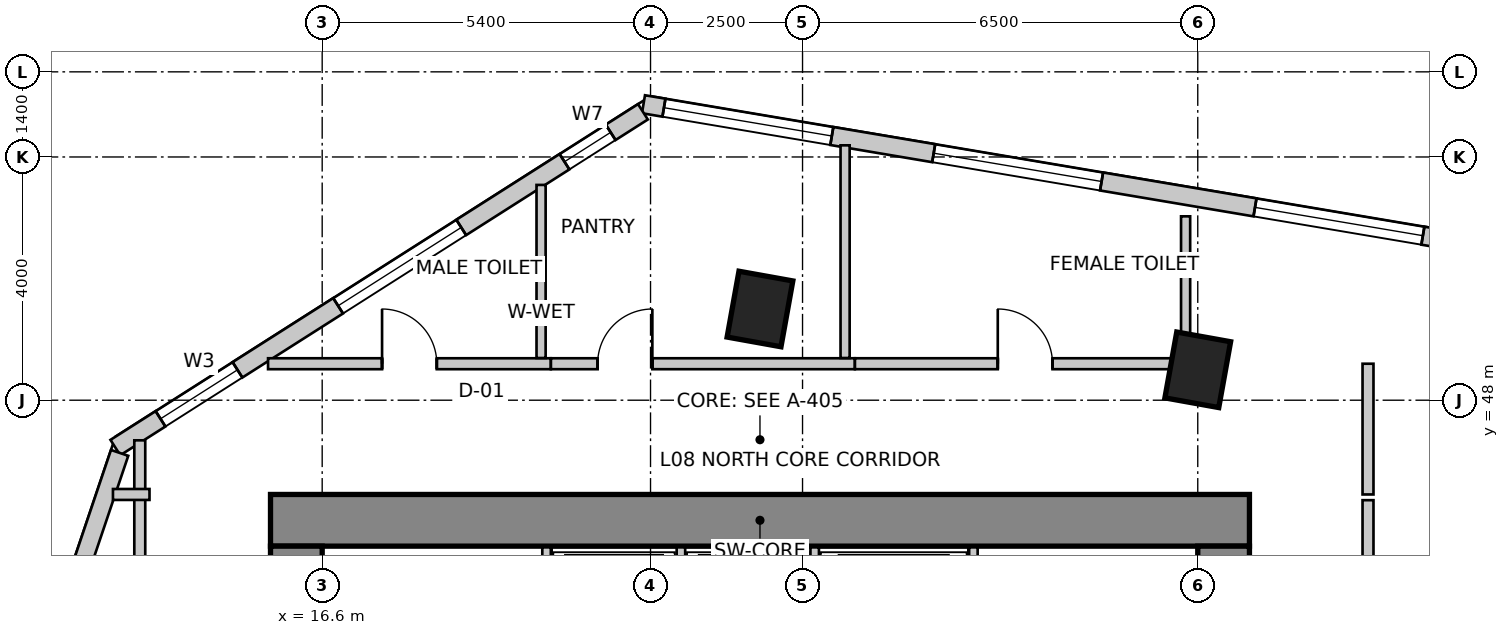
"""IFC4 building model, lengths in metres.
Left out: names, types, materials, properties, quantities, classifications, styles, units other than length and angle.
Written with IfcOpenShell. Run it as: python <this file> out.ifc"""

import sys

from ifc_helpers import new_model, si_unit, direction, frame, frame_2d, origin, origin_2d, place, context, subcontext, project, spatial, rectangle, extrude, source, transform, mapped, element, fill, save


model = new_model("IFC4")
c1 = context("Model", 3, precision=1e-05, world=origin(), true_north=direction((0.0, 1.0)))
c2 = subcontext(c1, "Body", "Model", "MODEL_VIEW")
j1 = project(units=[si_unit("LENGTHUNIT", "METRE"), si_unit("PLANEANGLEUNIT", "RADIAN")], contexts=[c1])
p1 = place(None, origin())
s1 = spatial("IfcSite", under=j1, at=p1, CompositionType="ELEMENT")
p2 = place(p1, origin())
s2 = spatial("IfcBuilding", under=s1, at=p2, CompositionType="ELEMENT")
p3 = place(p2, frame((0.0, 0.0, 35.0)))
s3 = spatial("IfcBuildingStorey", under=s2, at=p3, CompositionType="ELEMENT", Elevation=35.0)
p4 = place(p3, frame((15.75, 46.025, 0.0), z_axis=(0.0, 0.0, 1.0), x_axis=(1.0, 0.0, 0.0)))
e1 = element("IfcWall", 1, at=p4, inside=s3, PredefinedType="SHEAR", context=c2, shape_type="SweptSolid", body=[
    extrude(rectangle(XDim=16.1, YDim=0.85, at=frame_2d((8.05, 0.0))), origin(), (0.0, 0.0, 1.0), 4.0),
])
p5 = place(p3, frame((16.175, 34.2, 0.0), z_axis=(0.0, 0.0, 1.0), x_axis=(0.0, 1.0, 0.0)))
e2 = element("IfcWall", 2, at=p5, inside=s3, PredefinedType="SHEAR", context=c2, shape_type="SweptSolid", body=[
    extrude(rectangle(XDim=11.4, YDim=0.85, at=frame_2d((5.7, 0.0))), origin(), (0.0, 0.0, 1.0), 4.0),
])
m1 = source(origin(), c2, "Body", "SweptSolid", [
    extrude(rectangle(XDim=1.1, YDim=2.15, at=frame_2d((0.55, 1.075))), frame((0.0, 0.435, 0.0), z_axis=(0.0, -1.0, 0.0), x_axis=(1.0, 0.0, 0.0)), (0.0, 0.0, 1.0), 0.87),
])
p6 = place(p5, frame((7.15, 0.0, 0.0)))
e3 = element("IfcOpeningElement", 3, at=p6, cuts=e2, PredefinedType="OPENING", context=c2, shape_type="MappedRepresentation", body=[
    mapped(m1, transform((0.0, 0.0, 0.0), scale=1.0)),
])
p7 = place(p3, frame((31.425, 34.2, 0.0), z_axis=(0.0, 0.0, 1.0), x_axis=(0.0, 1.0, 0.0)))
e4 = element("IfcWall", 4, at=p7, inside=s3, PredefinedType="SHEAR", context=c2, shape_type="SweptSolid", body=[
    extrude(rectangle(XDim=11.4, YDim=0.85, at=frame_2d((5.7, 0.0))), origin(), (0.0, 0.0, 1.0), 4.0),
])
p8 = place(p7, frame((7.35, 0.0, 0.0)))
e5 = element("IfcOpeningElement", 5, at=p8, cuts=e4, PredefinedType="OPENING", context=c2, shape_type="MappedRepresentation", body=[
    mapped(m1, transform((0.0, 0.0, 0.0), scale=1.0)),
])
m2 = source(origin(), c2, "Body", "SweptSolid", [
    extrude(rectangle(XDim=0.9, YDim=1.1, at=origin_2d()), origin(), (0.0, 0.0, 1.0), 4.0),
])
for number, where, z_axis, x_axis in (
    (6, (23.8, 49.5, 0.0), (0.0, 0.0, 1.0), (0.984, -0.177, 0.0)),
    (7, (31.0, 48.5, 0.0), (0.0, 0.0, 1.0), (0.984, -0.177, 0.0)),
):
    element("IfcColumn", number, at=place(p3, frame(where, z_axis=z_axis, x_axis=x_axis)), inside=s3, PredefinedType="COLUMN", context=c2, shape_type="MappedRepresentation", body=[
        mapped(m2, transform((0.0, 0.0, 0.0), scale=1.0)),
    ])
p9 = place(p3, frame((58.761, 46.648, 0.0), z_axis=(0.0, 0.0, 1.0), x_axis=(-0.98607502735, 0.166301053624, 0.0)))
e8 = element("IfcWall", 8, at=p9, inside=s3, PredefinedType="SOLIDWALL", context=c2, shape_type="SweptSolid", body=[
    extrude(rectangle(XDim=37.397, YDim=0.3, at=frame_2d((18.699, 0.0))), origin(), (0.0, 0.0, 1.0), 3.75),
])
m3 = source(origin(), c2, "Body", "SweptSolid", [
    extrude(rectangle(XDim=2.4, YDim=2.2, at=frame_2d((1.2, 1.1))), frame((0.0, 0.16, 0.0), z_axis=(0.0, -1.0, 0.0), x_axis=(1.0, 0.0, 0.0)), (0.0, 0.0, 1.0), 0.32),
])
p10 = place(p9, frame((0.375, 0.0, 0.85)))
e9 = element("IfcOpeningElement", 9, at=p10, cuts=e8, PredefinedType="OPENING", context=c2, shape_type="MappedRepresentation", body=[
    mapped(m3, transform((0.0, 0.0, 0.0), scale=1.0)),
])
m4 = source(origin(), c2, "Body", "SweptSolid", [
    extrude(rectangle(XDim=2.8, YDim=2.4, at=frame_2d((1.4, 1.2))), frame((0.0, 0.16, 0.0), z_axis=(0.0, -1.0, 0.0), x_axis=(1.0, 0.0, 0.0)), (0.0, 0.0, 1.0), 0.32),
])
p11 = place(p9, frame((4.54, 0.0, 0.85)))
e10 = element("IfcOpeningElement", 10, at=p11, cuts=e8, PredefinedType="OPENING", context=c2, shape_type="MappedRepresentation", body=[
    mapped(m4, transform((0.0, 0.0, 0.0), scale=1.0)),
])
p12 = place(p9, frame((10.081, 0.0, 0.85)))
e11 = element("IfcOpeningElement", 11, at=p12, cuts=e8, PredefinedType="OPENING", context=c2, shape_type="MappedRepresentation", body=[
    mapped(m3, transform((0.0, 0.0, 0.0), scale=1.0)),
])
p13 = place(p9, frame((15.273, 0.0, 0.85)))
e12 = element("IfcOpeningElement", 12, at=p13, cuts=e8, PredefinedType="OPENING", context=c2, shape_type="MappedRepresentation", body=[
    mapped(m4, transform((0.0, 0.0, 0.0), scale=1.0)),
])
p14 = place(p9, frame((20.036, 0.0, 0.85)))
e13 = element("IfcOpeningElement", 13, at=p14, cuts=e8, PredefinedType="OPENING", context=c2, shape_type="MappedRepresentation", body=[
    mapped(m3, transform((0.0, 0.0, 0.0), scale=1.0)),
])
p15 = place(p9, frame((24.398, 0.0, 0.85)))
e14 = element("IfcOpeningElement", 14, at=p15, cuts=e8, PredefinedType="OPENING", context=c2, shape_type="MappedRepresentation", body=[
    mapped(m4, transform((0.0, 0.0, 0.0), scale=1.0)),
])
p16 = place(p9, frame((29.757, 0.0, 0.85)))
e15 = element("IfcOpeningElement", 15, at=p16, cuts=e8, PredefinedType="OPENING", context=c2, shape_type="MappedRepresentation", body=[
    mapped(m4, transform((0.0, 0.0, 0.0), scale=1.0)),
])
p17 = place(p9, frame((34.256, 0.0, 0.85)))
e16 = element("IfcOpeningElement", 16, at=p17, cuts=e8, PredefinedType="OPENING", context=c2, shape_type="MappedRepresentation", body=[
    mapped(m4, transform((0.0, 0.0, 0.0), scale=1.0)),
])
p18 = place(p3, frame((21.875, 52.743, 0.0), z_axis=(0.0, 0.0, 1.0), x_axis=(-0.843647802826, -0.536896996441, 0.0)))
e17 = element("IfcWall", 17, at=p18, inside=s3, PredefinedType="SOLIDWALL", context=c2, shape_type="SweptSolid", body=[
    extrude(rectangle(XDim=10.284, YDim=0.3, at=frame_2d((5.142, 0.0))), origin(), (0.0, 0.0, 1.0), 3.75),
])
m5 = source(origin(), c2, "Body", "SweptSolid", [
    extrude(rectangle(XDim=0.9, YDim=1.6, at=frame_2d((0.45, 0.8))), frame((0.0, 0.16, 0.0), z_axis=(0.0, -1.0, 0.0), x_axis=(1.0, 0.0, 0.0)), (0.0, 0.0, 1.0), 0.32),
])
p19 = place(p18, frame((0.629, 0.0, 0.85)))
e18 = element("IfcOpeningElement", 18, at=p19, cuts=e17, PredefinedType="OPENING", context=c2, shape_type="MappedRepresentation", body=[
    mapped(m5, transform((0.0, 0.0, 0.0), scale=1.0)),
])
p20 = place(p18, frame((3.542, 0.0, 0.85)))
e19 = element("IfcOpeningElement", 19, at=p20, cuts=e17, PredefinedType="OPENING", context=c2, shape_type="MappedRepresentation", body=[
    mapped(m3, transform((0.0, 0.0, 0.0), scale=1.0)),
])
m6 = source(origin(), c2, "Body", "SweptSolid", [
    extrude(rectangle(XDim=1.5, YDim=1.8, at=frame_2d((0.75, 0.9))), frame((0.0, 0.16, 0.0), z_axis=(0.0, -1.0, 0.0), x_axis=(1.0, 0.0, 0.0)), (0.0, 0.0, 1.0), 0.32),
])
p21 = place(p18, frame((7.904, 0.0, 0.85)))
e20 = element("IfcOpeningElement", 20, at=p21, cuts=e17, PredefinedType="OPENING", context=c2, shape_type="MappedRepresentation", body=[
    mapped(m6, transform((0.0, 0.0, 0.0), scale=1.0)),
])
p22 = place(p3, frame((13.269, 47.134, 0.0), z_axis=(0.0, 0.0, 1.0), x_axis=(-0.319920423265, -0.947444416722, 0.0)))
e21 = element("IfcWall", 21, at=p22, inside=s3, PredefinedType="SOLIDWALL", context=c2, shape_type="SweptSolid", body=[
    extrude(rectangle(XDim=16.135, YDim=0.3, at=frame_2d((8.067, 0.0))), origin(), (0.0, 0.0, 1.0), 3.75),
])
p23 = place(p22, frame((1.988, 0.0, 0.85)))
e22 = element("IfcOpeningElement", 22, at=p23, cuts=e21, PredefinedType="OPENING", context=c2, shape_type="MappedRepresentation", body=[
    mapped(m4, transform((0.0, 0.0, 0.0), scale=1.0)),
])
p24 = place(p22, frame((7.159, 0.0, 0.85)))
e23 = element("IfcOpeningElement", 23, at=p24, cuts=e21, PredefinedType="OPENING", context=c2, shape_type="MappedRepresentation", body=[
    mapped(m3, transform((0.0, 0.0, 0.0), scale=1.0)),
])
p25 = place(p22, frame((11.93, 0.0, 0.85)))
e24 = element("IfcOpeningElement", 24, at=p25, cuts=e21, PredefinedType="OPENING", context=c2, shape_type="MappedRepresentation", body=[
    mapped(m4, transform((0.0, 0.0, 0.0), scale=1.0)),
])
for number, where, z_axis, x_axis in (
    (25, (20.29, 43.28, 0.0), (0.0, 0.0, 1.0), (0.0, 1.0, 0.0)),
    (26, (27.31, 43.28, 0.0), (0.0, 0.0, 1.0), (0.0, 1.0, 0.0)),
):
    element("IfcWall", number, at=place(p3, frame(where, z_axis=z_axis, x_axis=x_axis)), inside=s3, PredefinedType="SOLIDWALL", context=c2, shape_type="SweptSolid", body=[
        extrude(rectangle(XDim=2.3, YDim=0.14, at=frame_2d((1.15, 0.0))), origin(), (0.0, 0.0, 1.0), 3.75),
    ])
for number, where, z_axis, x_axis in (
    (27, (22.5, 43.02, 0.0), (0.0, 0.0, 1.0), (0.0, 1.0, 0.0)),
    (28, (24.7, 43.02, 0.0), (0.0, 0.0, 1.0), (0.0, 1.0, 0.0)),
):
    element("IfcWall", number, at=place(p3, frame(where, z_axis=z_axis, x_axis=x_axis)), inside=s3, PredefinedType="SOLIDWALL", context=c2, shape_type="SweptSolid", body=[
        extrude(rectangle(XDim=2.56, YDim=0.14, at=frame_2d((1.28, 0.0))), origin(), (0.0, 0.0, 1.0), 3.75),
    ])
p26 = place(p3, frame((13.6, 33.444, 0.0), z_axis=(0.0, 0.0, 1.0), x_axis=(0.0, 1.0, 0.0)))
e29 = element("IfcWall", 29, at=p26, inside=s3, PredefinedType="PARTITIONING", context=c2, shape_type="SweptSolid", body=[
    extrude(rectangle(XDim=13.896, YDim=0.18, at=frame_2d((6.948, 0.0))), origin(), (0.0, 0.0, 1.0), 2.892),
])
m7 = source(origin(), c2, "Body", "SweptSolid", [
    extrude(rectangle(XDim=0.9, YDim=2.15, at=frame_2d((0.45, 1.075))), frame((0.0, 0.1, 0.0), z_axis=(0.0, -1.0, 0.0), x_axis=(1.0, 0.0, 0.0)), (0.0, 0.0, 1.0), 0.2),
])
p27 = place(p26, frame((4.144, 0.0, 0.0)))
e30 = element("IfcOpeningElement", 30, at=p27, cuts=e29, PredefinedType="OPENING", context=c2, shape_type="MappedRepresentation", body=[
    mapped(m7, transform((0.0, 0.0, 0.0), scale=1.0)),
])
p28 = place(p3, frame((13.76, 46.45, 0.0), z_axis=(0.0, 0.0, 1.0), x_axis=(-1.0, 0.0, 0.0)))
e31 = element("IfcWall", 31, at=p28, inside=s3, PredefinedType="PARTITIONING", context=c2, shape_type="SweptSolid", body=[
    extrude(rectangle(XDim=0.601, YDim=0.18, at=frame_2d((0.301, 0.0))), origin(), (0.0, 0.0, 1.0), 3.75),
])
p29 = place(p3, frame((15.71, 48.6, 0.0), z_axis=(0.0, 0.0, 1.0), x_axis=(1.0, 0.0, 0.0)))
e32 = element("IfcWall", 32, at=p29, inside=s3, PredefinedType="PARTITIONING", context=c2, shape_type="SweptSolid", body=[
    extrude(rectangle(XDim=4.65, YDim=0.18, at=frame_2d((2.325, 0.0))), origin(), (0.0, 0.0, 1.0), 3.75),
])
p30 = place(p29, frame((1.875, 0.0, 0.0)))
e33 = element("IfcOpeningElement", 33, at=p30, cuts=e32, PredefinedType="OPENING", context=c2, shape_type="MappedRepresentation", body=[
    mapped(m7, transform((0.0, 0.0, 0.0), scale=1.0)),
])
p31 = place(p3, frame((20.362, 48.6, 0.0), z_axis=(0.0, 0.0, 1.0), x_axis=(1.0, 0.0, 0.0)))
e34 = element("IfcWall", 34, at=p31, inside=s3, PredefinedType="PARTITIONING", context=c2, shape_type="SweptSolid", body=[
    extrude(rectangle(XDim=4.998, YDim=0.18, at=frame_2d((2.499, 0.0))), origin(), (0.0, 0.0, 1.0), 3.434),
])
p32 = place(p31, frame((0.768, 0.0, 0.0)))
e35 = element("IfcOpeningElement", 35, at=p32, cuts=e34, PredefinedType="OPENING", context=c2, shape_type="MappedRepresentation", body=[
    mapped(m7, transform((0.0, 0.0, 0.0), scale=1.0)),
])
p33 = place(p3, frame((25.362, 48.6, 0.0), z_axis=(0.0, 0.0, 1.0), x_axis=(1.0, 0.0, 0.0)))
e36 = element("IfcWall", 36, at=p33, inside=s3, PredefinedType="PARTITIONING", context=c2, shape_type="SweptSolid", body=[
    extrude(rectangle(XDim=5.598, YDim=0.18, at=frame_2d((2.799, 0.0))), origin(), (0.0, 0.0, 1.0), 2.892),
])
p34 = place(p33, frame((2.349, 0.0, 0.0)))
e37 = element("IfcOpeningElement", 37, at=p34, cuts=e36, PredefinedType="OPENING", context=c2, shape_type="MappedRepresentation", body=[
    mapped(m7, transform((0.0, 0.0, 0.0), scale=1.0)),
])
p35 = place(p3, frame((33.8, 48.6, 0.0), z_axis=(0.0, 0.0, 1.0), x_axis=(0.0, -1.0, 0.0)))
e38 = element("IfcWall", 38, at=p35, inside=s3, PredefinedType="PARTITIONING", context=c2, shape_type="SweptSolid", body=[
    extrude(rectangle(XDim=2.15, YDim=0.18, at=frame_2d((1.075, 0.0))), origin(), (0.0, 0.0, 1.0), 2.892),
])
p36 = place(p3, frame((33.8, 46.356, 0.0), z_axis=(0.0, 0.0, 1.0), x_axis=(0.0, -1.0, 0.0)))
e39 = element("IfcWall", 39, at=p36, inside=s3, PredefinedType="PARTITIONING", context=c2, shape_type="SweptSolid", body=[
    extrude(rectangle(XDim=8.516, YDim=0.18, at=frame_2d((4.258, 0.0))), origin(), (0.0, 0.0, 1.0), 3.322),
])
p37 = place(p3, frame((20.2, 51.54, 0.0), z_axis=(0.0, 0.0, 1.0), x_axis=(0.0, -1.0, 0.0)))
e40 = element("IfcWall", 40, at=p37, inside=s3, PredefinedType="PARTITIONING", context=c2, shape_type="SweptSolid", body=[
    extrude(rectangle(XDim=2.846, YDim=0.15, at=frame_2d((1.423, 0.0))), origin(), (0.0, 0.0, 1.0), 3.75),
])
p38 = place(p3, frame((25.2, 52.192, 0.0), z_axis=(0.0, 0.0, 1.0), x_axis=(0.0, -1.0, 0.0)))
e41 = element("IfcWall", 41, at=p38, inside=s3, PredefinedType="PARTITIONING", context=c2, shape_type="SweptSolid", body=[
    extrude(rectangle(XDim=3.498, YDim=0.15, at=frame_2d((1.749, 0.0))), origin(), (0.0, 0.0, 1.0), 2.892),
])
p39 = place(p3, frame((30.8, 51.024, 0.0), z_axis=(0.0, 0.0, 1.0), x_axis=(0.0, -1.0, 0.0)))
e42 = element("IfcWall", 42, at=p39, inside=s3, PredefinedType="PARTITIONING", context=c2, shape_type="SweptSolid", body=[
    extrude(rectangle(XDim=2.204, YDim=0.15, at=frame_2d((1.102, 0.0))), origin(), (0.0, 0.0, 1.0), 3.75),
])
m8 = source(origin(), c2, "Body", "SweptSolid", [
    extrude(rectangle(XDim=2.8, YDim=2.4, at=frame_2d((1.4, 1.2))), frame((0.0, -0.015, 0.0), z_axis=(0.0, -1.0, 0.0), x_axis=(1.0, 0.0, 0.0)), (0.0, 0.0, 1.0), 0.06),
])
p40 = place(p15, origin())
e43 = element("IfcWindow", 43, at=p40, inside=s3, PartitioningType="SINGLE_PANEL", PredefinedType="WINDOW", context=c2, shape_type="MappedRepresentation", body=[
    mapped(m8, transform((0.0, 0.0, 0.0), scale=1.0)),
])
fill(e14, e43)
p41 = place(p16, origin())
e44 = element("IfcWindow", 44, at=p41, inside=s3, PartitioningType="SINGLE_PANEL", PredefinedType="WINDOW", context=c2, shape_type="MappedRepresentation", body=[
    mapped(m8, transform((0.0, 0.0, 0.0), scale=1.0)),
])
fill(e15, e44)
p42 = place(p17, origin())
e45 = element("IfcWindow", 45, at=p42, inside=s3, PartitioningType="SINGLE_PANEL", PredefinedType="WINDOW", context=c2, shape_type="MappedRepresentation", body=[
    mapped(m8, transform((0.0, 0.0, 0.0), scale=1.0)),
])
fill(e16, e45)
m9 = source(origin(), c2, "Body", "SweptSolid", [
    extrude(rectangle(XDim=0.9, YDim=1.6, at=frame_2d((0.45, 0.8))), frame((0.0, -0.015, 0.0), z_axis=(0.0, -1.0, 0.0), x_axis=(1.0, 0.0, 0.0)), (0.0, 0.0, 1.0), 0.06),
])
p43 = place(p19, origin())
e46 = element("IfcWindow", 46, at=p43, inside=s3, PartitioningType="SINGLE_PANEL", PredefinedType="WINDOW", context=c2, shape_type="MappedRepresentation", body=[
    mapped(m9, transform((0.0, 0.0, 0.0), scale=1.0)),
])
fill(e18, e46)
m10 = source(origin(), c2, "Body", "SweptSolid", [
    extrude(rectangle(XDim=2.4, YDim=2.2, at=frame_2d((1.2, 1.1))), frame((0.0, -0.015, 0.0), z_axis=(0.0, -1.0, 0.0), x_axis=(1.0, 0.0, 0.0)), (0.0, 0.0, 1.0), 0.06),
])
p44 = place(p20, origin())
e47 = element("IfcWindow", 47, at=p44, inside=s3, PartitioningType="SINGLE_PANEL", PredefinedType="WINDOW", context=c2, shape_type="MappedRepresentation", body=[
    mapped(m10, transform((0.0, 0.0, 0.0), scale=1.0)),
])
fill(e19, e47)
m11 = source(origin(), c2, "Body", "SweptSolid", [
    extrude(rectangle(XDim=1.5, YDim=1.8, at=frame_2d((0.75, 0.9))), frame((0.0, -0.015, 0.0), z_axis=(0.0, -1.0, 0.0), x_axis=(1.0, 0.0, 0.0)), (0.0, 0.0, 1.0), 0.06),
])
p45 = place(p21, origin())
e48 = element("IfcWindow", 48, at=p45, inside=s3, PartitioningType="SINGLE_PANEL", PredefinedType="WINDOW", context=c2, shape_type="MappedRepresentation", body=[
    mapped(m11, transform((0.0, 0.0, 0.0), scale=1.0)),
])
fill(e20, e48)
m12 = source(origin(), c2, "Body", "SweptSolid", [
    extrude(rectangle(XDim=0.9, YDim=2.15, at=frame_2d((0.45, 1.075))), frame((0.0, 0.025, 0.0), z_axis=(0.0, -1.0, 0.0), x_axis=(1.0, 0.0, 0.0)), (0.0, 0.0, 1.0), 0.05),
])
p46 = place(p30, origin())
e49 = element("IfcDoor", 49, at=p46, inside=s3, OperationType="SINGLE_SWING_LEFT", PredefinedType="DOOR", context=c2, shape_type="MappedRepresentation", body=[
    mapped(m12, transform((0.0, 0.0, 0.0), scale=1.0)),
])
fill(e33, e49)
p47 = place(p32, origin())
e50 = element("IfcDoor", 50, at=p47, inside=s3, OperationType="SINGLE_SWING_RIGHT", PredefinedType="DOOR", context=c2, shape_type="MappedRepresentation", body=[
    mapped(m12, transform((0.0, 0.0, 0.0), scale=1.0)),
])
fill(e35, e50)
p48 = place(p34, origin())
e51 = element("IfcDoor", 51, at=p48, inside=s3, OperationType="SINGLE_SWING_LEFT", PredefinedType="DOOR", context=c2, shape_type="MappedRepresentation", body=[
    mapped(m12, transform((0.0, 0.0, 0.0), scale=1.0)),
])
fill(e37, e51)
save(model, sys.argv[1])
